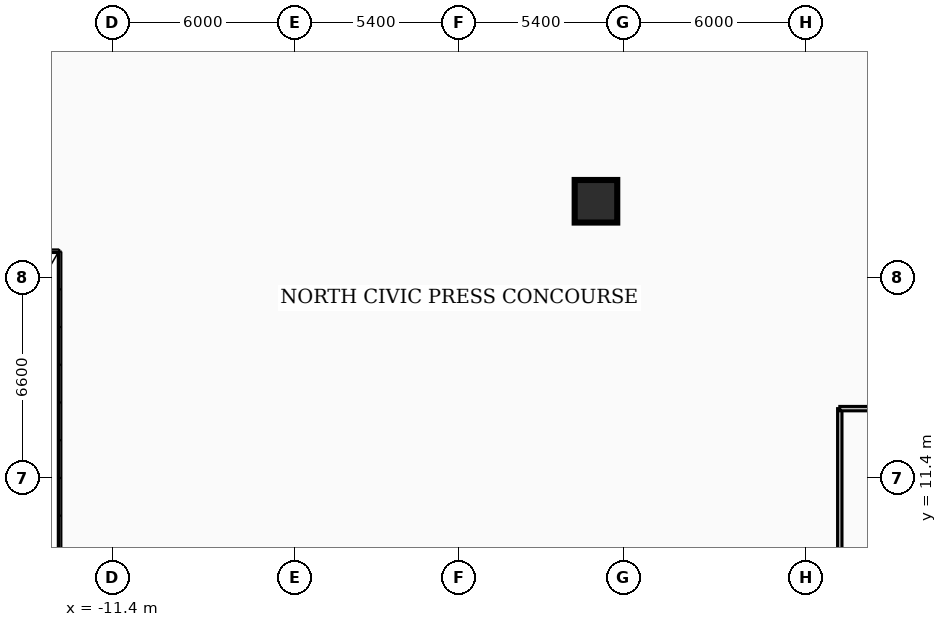
"""IFC4 building model, lengths in metres.
Left out: names, types, materials, properties, quantities, classifications, styles, units other than length and angle.
Written with IfcOpenShell. Run it as: python <this file> out.ifc"""

import sys

from ifc_helpers import new_model, si_unit, direction, frame, frame_2d, origin, origin_2d, place, context, subcontext, project, spatial, rectangle, extrude, element, save


model = new_model("IFC4")
c1 = context("Model", 3, precision=1e-05, world=origin(), true_north=direction((0.0, 1.0)))
c2 = subcontext(c1, "Body", "Model", "MODEL_VIEW")
j1 = project(units=[si_unit("LENGTHUNIT", "METRE"), si_unit("PLANEANGLEUNIT", "RADIAN")], contexts=[c1])
p1 = place(None, origin())
s1 = spatial("IfcSite", under=j1, at=p1, CompositionType="ELEMENT")
p2 = place(p1, origin())
s2 = spatial("IfcBuilding", under=s1, at=p2, CompositionType="ELEMENT")
p3 = place(p2, frame((0.0, 0.0, 14.76)))
s3 = spatial("IfcBuildingStorey", under=s2, at=p3, CompositionType="ELEMENT", Elevation=14.76)
p4 = place(p3, frame((4.5, 20.5, 0.0), z_axis=(0.0, 0.0, 1.0), x_axis=(1.0, 0.0, 0.0)))
e1 = element("IfcColumn", 1, at=p4, inside=s3, PredefinedType="COLUMN", context=c2, shape_type="SweptSolid", body=[
    extrude(rectangle(XDim=1.4, YDim=1.4, at=origin_2d()), origin(), (0.0, 0.0, 1.0), 4.68),
])
p5 = place(p3, frame((12.52, 2.72, 0.0), z_axis=(0.0, 0.0, 1.0), x_axis=(0.0, 1.0, 0.0)))
e2 = element("IfcWall", 2, at=p5, inside=s3, PredefinedType="PARTITIONING", context=c2, shape_type="SweptSolid", body=[
    extrude(rectangle(XDim=10.96, YDim=0.145, at=frame_2d((5.48, 0.0))), origin(), (0.0, 0.0, 1.0), 3.29),
])
p6 = place(p5, frame((4.9, 0.0, 0.0)))
e3 = element("IfcOpeningElement", 3, at=p6, cuts=e2, PredefinedType="OPENING", context=c2, shape_type="SweptSolid", body=[
    extrude(rectangle(XDim=1.0, YDim=2.1, at=frame_2d((0.5, 1.05))), frame((0.0, 0.083, 0.0), z_axis=(0.0, -1.0, 0.0), x_axis=(1.0, 0.0, 0.0)), (0.0, 0.0, 1.0), 0.165),
])
p7 = place(p3, frame((12.52, 13.68, 0.0), z_axis=(0.0, 0.0, 1.0), x_axis=(1.0, 0.0, 0.0)))
e4 = element("IfcWall", 4, at=p7, inside=s3, PredefinedType="PARTITIONING", context=c2, shape_type="SweptSolid", body=[
    extrude(rectangle(XDim=9.88, YDim=0.145, at=frame_2d((4.94, 0.0))), origin(), (0.0, 0.0, 1.0), 4.28),
])
save(model, sys.argv[1])
